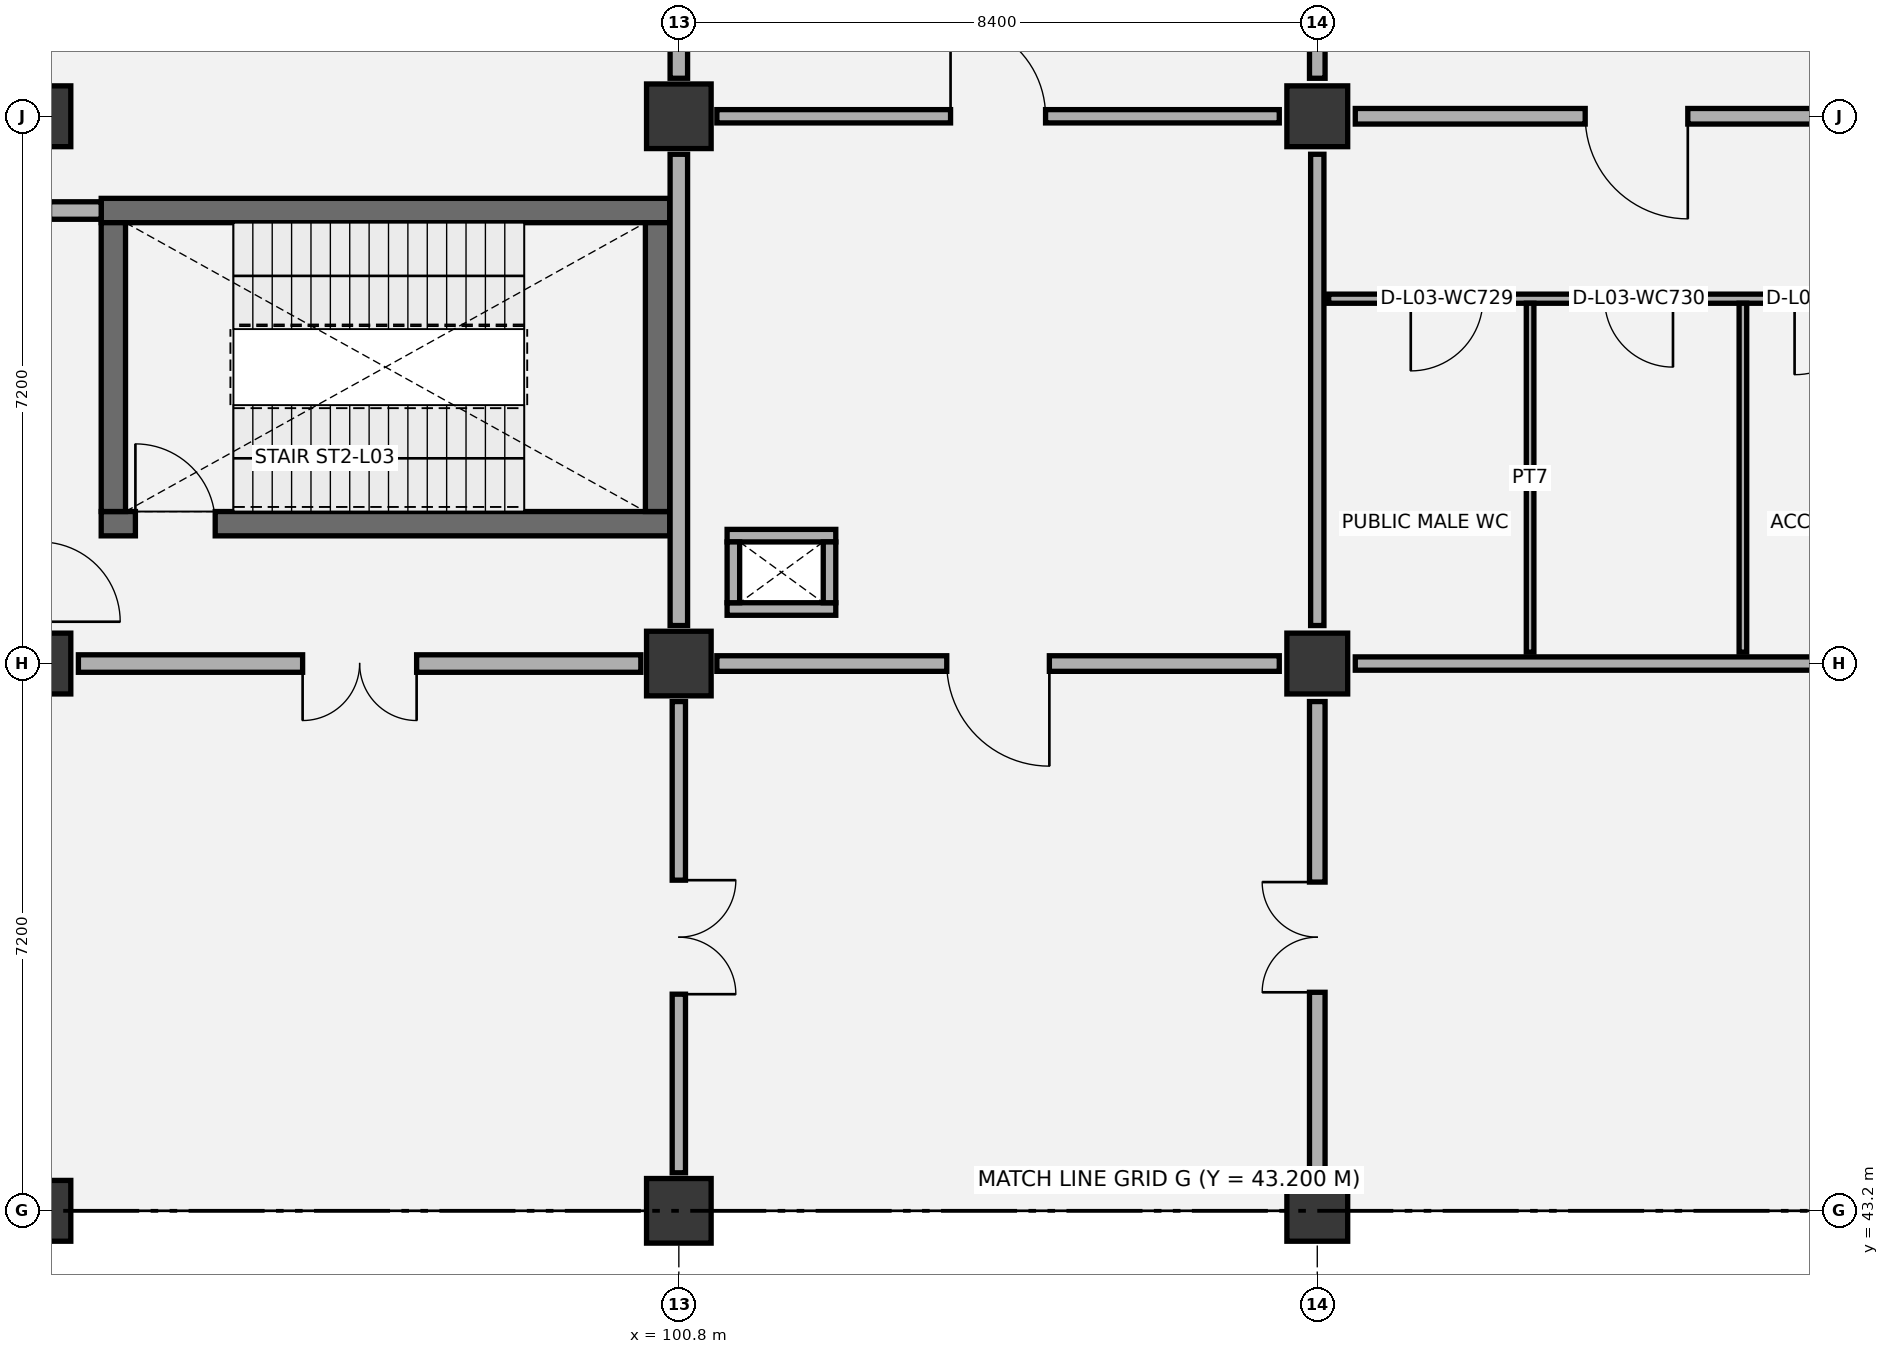
"""IFC4 building model, lengths in metres.
Left out: names, types, materials, properties, quantities, classifications, styles, units other than length and angle.
Written with IfcOpenShell. Run it as: python <this file> out.ifc"""

import sys

from ifc_helpers import new_model, si_unit, direction, frame, frame_2d, origin, origin_2d, place, context, subcontext, project, spatial, rectangle, extrude, element, fill, save


model = new_model("IFC4")
c1 = context("Model", 3, precision=1e-05, world=origin(), true_north=direction((0.0, 1.0)))
c2 = subcontext(c1, "Body", "Model", "MODEL_VIEW")
j1 = project(units=[si_unit("LENGTHUNIT", "METRE"), si_unit("PLANEANGLEUNIT", "RADIAN")], contexts=[c1])
p1 = place(None, origin())
s1 = spatial("IfcSite", under=j1, at=p1, CompositionType="ELEMENT")
p2 = place(p1, origin())
s2 = spatial("IfcBuilding", under=s1, at=p2, CompositionType="ELEMENT")
p3 = place(p2, frame((0.0, 0.0, 16.8)))
s3 = spatial("IfcBuildingStorey", under=s2, at=p3, CompositionType="ELEMENT", Elevation=16.8)
for number, where, z_axis, x_axis in (
    (1, (92.4, 43.2, 0.0), (0.0, 0.0, 1.0), (1.0, 0.0, 0.0)),
    (2, (92.4, 50.4, 0.0), (0.0, 0.0, 1.0), (1.0, 0.0, 0.0)),
    (3, (92.4, 57.6, 0.0), (0.0, 0.0, 1.0), (1.0, 0.0, 0.0)),
):
    element("IfcColumn", number, at=place(p3, frame(where, z_axis=z_axis, x_axis=x_axis)), inside=s3, PredefinedType="COLUMN", context=c2, shape_type="SweptSolid", body=[
        extrude(rectangle(XDim=0.8, YDim=0.8, at=origin_2d()), origin(), (0.0, 0.0, 1.0), 5.4),
    ])
for number, where, z_axis, x_axis in (
    (4, (100.8, 43.2, 0.0), (0.0, 0.0, 1.0), (1.0, 0.0, 0.0)),
    (5, (100.8, 50.4, 0.0), (0.0, 0.0, 1.0), (1.0, 0.0, 0.0)),
    (6, (100.8, 57.6, 0.0), (0.0, 0.0, 1.0), (1.0, 0.0, 0.0)),
):
    element("IfcColumn", number, at=place(p3, frame(where, z_axis=z_axis, x_axis=x_axis)), inside=s3, PredefinedType="COLUMN", context=c2, shape_type="SweptSolid", body=[
        extrude(rectangle(XDim=0.85, YDim=0.85, at=origin_2d()), origin(), (0.0, 0.0, 1.0), 5.4),
    ])
for number, where, z_axis, x_axis in (
    (7, (109.2, 43.2, 0.0), (0.0, 0.0, 1.0), (1.0, 0.0, 0.0)),
    (8, (109.2, 50.4, 0.0), (0.0, 0.0, 1.0), (1.0, 0.0, 0.0)),
    (9, (109.2, 57.6, 0.0), (0.0, 0.0, 1.0), (1.0, 0.0, 0.0)),
):
    element("IfcColumn", number, at=place(p3, frame(where, z_axis=z_axis, x_axis=x_axis)), inside=s3, PredefinedType="COLUMN", context=c2, shape_type="SweptSolid", body=[
        extrude(rectangle(XDim=0.8, YDim=0.8, at=origin_2d()), origin(), (0.0, 0.0, 1.0), 5.4),
    ])
p4 = place(p3, frame((93.2, 52.24, 0.0), z_axis=(0.0, 0.0, 1.0), x_axis=(1.0, 0.0, 0.0)))
e10 = element("IfcWall", 10, at=p4, inside=s3, PredefinedType="SHEAR", context=c2, shape_type="SweptSolid", body=[
    extrude(rectangle(XDim=7.48, YDim=0.32, at=frame_2d((3.74, 0.0))), origin(), (0.0, 0.0, 1.0), 4.95),
])
p5 = place(p4, frame((0.45, 0.0, 0.0)))
e11 = element("IfcOpeningElement", 11, at=p5, cuts=e10, PredefinedType="OPENING", context=c2, shape_type="SweptSolid", body=[
    extrude(rectangle(XDim=1.05, YDim=2.15, at=frame_2d((0.525, 1.075))), frame((0.0, 0.17, 0.0), z_axis=(0.0, -1.0, 0.0), x_axis=(1.0, 0.0, 0.0)), (0.0, 0.0, 1.0), 0.34),
])
p6 = place(p3, frame((93.2, 56.36, 0.0), z_axis=(0.0, 0.0, 1.0), x_axis=(1.0, 0.0, 0.0)))
e12 = element("IfcWall", 12, at=p6, inside=s3, PredefinedType="SHEAR", context=c2, shape_type="SweptSolid", body=[
    extrude(rectangle(XDim=7.48, YDim=0.32, at=frame_2d((3.74, 0.0))), origin(), (0.0, 0.0, 1.0), 4.95),
])
for number, where, z_axis, x_axis in (
    (13, (93.36, 52.4, 0.0), (0.0, 0.0, 1.0), (0.0, 1.0, 0.0)),
    (14, (100.52, 52.4, 0.0), (0.0, 0.0, 1.0), (0.0, 1.0, 0.0)),
):
    element("IfcWall", number, at=place(p3, frame(where, z_axis=z_axis, x_axis=x_axis)), inside=s3, PredefinedType="SHEAR", context=c2, shape_type="SweptSolid", body=[
        extrude(rectangle(XDim=3.8, YDim=0.32, at=frame_2d((1.9, 0.0))), origin(), (0.0, 0.0, 1.0), 4.95),
    ])
for number, where, z_axis, x_axis in (
    (15, (101.435, 51.117, 0.0), (0.0, 0.0, 1.0), (1.0, 0.0, 0.0)),
    (16, (101.435, 52.083, 0.0), (0.0, 0.0, 1.0), (1.0, 0.0, 0.0)),
):
    element("IfcWall", number, at=place(p3, frame(where, z_axis=z_axis, x_axis=x_axis)), inside=s3, PredefinedType="PARTITIONING", context=c2, shape_type="SweptSolid", body=[
        extrude(rectangle(XDim=1.43, YDim=0.165, at=frame_2d((0.715, 0.0))), origin(), (0.0, 0.0, 1.0), 4.825),
    ])
for number, where, z_axis, x_axis in (
    (17, (101.518, 51.2, 0.0), (0.0, 0.0, 1.0), (0.0, 1.0, 0.0)),
    (18, (102.782, 51.2, 0.0), (0.0, 0.0, 1.0), (0.0, 1.0, 0.0)),
):
    element("IfcWall", number, at=place(p3, frame(where, z_axis=z_axis, x_axis=x_axis)), inside=s3, PredefinedType="PARTITIONING", context=c2, shape_type="SweptSolid", body=[
        extrude(rectangle(XDim=0.8, YDim=0.165, at=frame_2d((0.4, 0.0))), origin(), (0.0, 0.0, 1.0), 4.825),
    ])
p7 = place(p3, frame((109.35, 55.2, 0.0), z_axis=(0.0, 0.0, 1.0), x_axis=(1.0, 0.0, 0.0)))
e19 = element("IfcWall", 19, at=p7, inside=s3, PredefinedType="PARTITIONING", context=c2, shape_type="SweptSolid", body=[
    extrude(rectangle(XDim=8.1, YDim=0.12, at=frame_2d((4.05, 0.0))), origin(), (0.0, 0.0, 1.0), 4.95),
])
p8 = place(p7, frame((1.08, 0.0, 0.0)))
e20 = element("IfcOpeningElement", 20, at=p8, cuts=e19, PredefinedType="OPENING", context=c2, shape_type="SweptSolid", body=[
    extrude(rectangle(XDim=0.95, YDim=2.1, at=frame_2d((0.475, 1.05))), frame((0.0, 0.07, 0.0), z_axis=(0.0, -1.0, 0.0), x_axis=(1.0, 0.0, 0.0)), (0.0, 0.0, 1.0), 0.14),
])
p9 = place(p7, frame((3.63, 0.0, 0.0)))
e21 = element("IfcOpeningElement", 21, at=p9, cuts=e19, PredefinedType="OPENING", context=c2, shape_type="SweptSolid", body=[
    extrude(rectangle(XDim=0.9, YDim=2.1, at=frame_2d((0.45, 1.05))), frame((0.0, 0.07, 0.0), z_axis=(0.0, -1.0, 0.0), x_axis=(1.0, 0.0, 0.0)), (0.0, 0.0, 1.0), 0.14),
])
p10 = place(p7, frame((6.13, 0.0, 0.0)))
e22 = element("IfcOpeningElement", 22, at=p10, cuts=e19, PredefinedType="OPENING", context=c2, shape_type="SweptSolid", body=[
    extrude(rectangle(XDim=1.0, YDim=2.1, at=frame_2d((0.5, 1.05))), frame((0.0, 0.07, 0.0), z_axis=(0.0, -1.0, 0.0), x_axis=(1.0, 0.0, 0.0)), (0.0, 0.0, 1.0), 0.14),
])
for number, where, z_axis, x_axis in (
    (23, (112.0, 50.55, 0.0), (0.0, 0.0, 1.0), (0.0, 1.0, 0.0)),
    (24, (114.8, 50.55, 0.0), (0.0, 0.0, 1.0), (0.0, 1.0, 0.0)),
):
    element("IfcWall", number, at=place(p3, frame(where, z_axis=z_axis, x_axis=x_axis)), inside=s3, PredefinedType="PARTITIONING", context=c2, shape_type="SweptSolid", body=[
        extrude(rectangle(XDim=4.59, YDim=0.1, at=frame_2d((2.295, 0.0))), origin(), (0.0, 0.0, 1.0), 4.95),
    ])
p11 = place(p3, frame((100.8, 43.7, 0.0), z_axis=(0.0, 0.0, 1.0), x_axis=(0.0, 1.0, 0.0)))
e25 = element("IfcWall", 25, at=p11, inside=s3, PredefinedType="PARTITIONING", context=c2, shape_type="SweptSolid", body=[
    extrude(rectangle(XDim=6.2, YDim=0.175, at=frame_2d((3.1, 0.0))), origin(), (0.0, 0.0, 1.0), 4.245),
])
p12 = place(p11, frame((2.35, 0.0, 0.0)))
e26 = element("IfcOpeningElement", 26, at=p12, cuts=e25, PredefinedType="OPENING", context=c2, shape_type="SweptSolid", body=[
    extrude(rectangle(XDim=1.5, YDim=2.2, at=frame_2d((0.75, 1.1))), frame((0.0, 0.097, 0.0), z_axis=(0.0, -1.0, 0.0), x_axis=(1.0, 0.0, 0.0)), (0.0, 0.0, 1.0), 0.195),
])
p13 = place(p3, frame((92.9, 50.4, 0.0), z_axis=(0.0, 0.0, 1.0), x_axis=(1.0, 0.0, 0.0)))
e27 = element("IfcWall", 27, at=p13, inside=s3, PredefinedType="PARTITIONING", context=c2, shape_type="SweptSolid", body=[
    extrude(rectangle(XDim=7.4, YDim=0.23, at=frame_2d((3.7, 0.0))), origin(), (0.0, 0.0, 1.0), 4.195),
])
p14 = place(p13, frame((2.95, 0.0, 0.0)))
e28 = element("IfcOpeningElement", 28, at=p14, cuts=e27, PredefinedType="OPENING", context=c2, shape_type="SweptSolid", body=[
    extrude(rectangle(XDim=1.5, YDim=2.15, at=frame_2d((0.75, 1.075))), frame((0.0, 0.125, 0.0), z_axis=(0.0, -1.0, 0.0), x_axis=(1.0, 0.0, 0.0)), (0.0, 0.0, 1.0), 0.25),
])
p15 = place(p3, frame((100.8, 50.9, 0.0), z_axis=(0.0, 0.0, 1.0), x_axis=(0.0, 1.0, 0.0)))
e29 = element("IfcWall", 29, at=p15, inside=s3, PredefinedType="PARTITIONING", context=c2, shape_type="SweptSolid", body=[
    extrude(rectangle(XDim=6.2, YDim=0.23, at=frame_2d((3.1, 0.0))), origin(), (0.0, 0.0, 1.0), 4.445),
])
p16 = place(p3, frame((92.52, 56.36, 0.0), z_axis=(0.0, 0.0, 1.0), x_axis=(1.0, 0.0, 0.0)))
e30 = element("IfcWall", 30, at=p16, inside=s3, PredefinedType="PARTITIONING", context=c2, shape_type="SweptSolid", body=[
    extrude(rectangle(XDim=0.68, YDim=0.23, at=frame_2d((0.34, 0.0))), origin(), (0.0, 0.0, 1.0), 4.95),
])
p17 = place(p3, frame((100.8, 58.1, 0.0), z_axis=(0.0, 0.0, 1.0), x_axis=(0.0, 1.0, 0.0)))
e31 = element("IfcWall", 31, at=p17, inside=s3, PredefinedType="PARTITIONING", context=c2, shape_type="SweptSolid", body=[
    extrude(rectangle(XDim=6.2, YDim=0.23, at=frame_2d((3.1, 0.0))), origin(), (0.0, 0.0, 1.0), 4.245),
])
p18 = place(p3, frame((109.2, 43.7, 0.0), z_axis=(0.0, 0.0, 1.0), x_axis=(0.0, 1.0, 0.0)))
e32 = element("IfcWall", 32, at=p18, inside=s3, PredefinedType="PARTITIONING", context=c2, shape_type="SweptSolid", body=[
    extrude(rectangle(XDim=6.2, YDim=0.205, at=frame_2d((3.1, 0.0))), origin(), (0.0, 0.0, 1.0), 4.445),
])
p19 = place(p18, frame((2.375, 0.0, 0.0)))
e33 = element("IfcOpeningElement", 33, at=p19, cuts=e32, PredefinedType="OPENING", context=c2, shape_type="SweptSolid", body=[
    extrude(rectangle(XDim=1.45, YDim=2.2, at=frame_2d((0.725, 1.1))), frame((0.0, 0.113, 0.0), z_axis=(0.0, -1.0, 0.0), x_axis=(1.0, 0.0, 0.0)), (0.0, 0.0, 1.0), 0.225),
])
p20 = place(p3, frame((101.3, 50.4, 0.0), z_axis=(0.0, 0.0, 1.0), x_axis=(1.0, 0.0, 0.0)))
e34 = element("IfcWall", 34, at=p20, inside=s3, PredefinedType="PARTITIONING", context=c2, shape_type="SweptSolid", body=[
    extrude(rectangle(XDim=7.4, YDim=0.205, at=frame_2d((3.7, 0.0))), origin(), (0.0, 0.0, 1.0), 4.195),
])
p21 = place(p20, frame((3.025, 0.0, 0.0)))
e35 = element("IfcOpeningElement", 35, at=p21, cuts=e34, PredefinedType="OPENING", context=c2, shape_type="SweptSolid", body=[
    extrude(rectangle(XDim=1.35, YDim=2.15, at=frame_2d((0.675, 1.075))), frame((0.0, 0.113, 0.0), z_axis=(0.0, -1.0, 0.0), x_axis=(1.0, 0.0, 0.0)), (0.0, 0.0, 1.0), 0.225),
])
p22 = place(p3, frame((109.2, 50.9, 0.0), z_axis=(0.0, 0.0, 1.0), x_axis=(0.0, 1.0, 0.0)))
e36 = element("IfcWall", 36, at=p22, inside=s3, PredefinedType="PARTITIONING", context=c2, shape_type="SweptSolid", body=[
    extrude(rectangle(XDim=6.2, YDim=0.175, at=frame_2d((3.1, 0.0))), origin(), (0.0, 0.0, 1.0), 4.245),
])
p23 = place(p3, frame((101.3, 57.6, 0.0), z_axis=(0.0, 0.0, 1.0), x_axis=(1.0, 0.0, 0.0)))
e37 = element("IfcWall", 37, at=p23, inside=s3, PredefinedType="PARTITIONING", context=c2, shape_type="SweptSolid", body=[
    extrude(rectangle(XDim=7.4, YDim=0.175, at=frame_2d((3.7, 0.0))), origin(), (0.0, 0.0, 1.0), 4.195),
])
p24 = place(p23, frame((3.075, 0.0, 0.0)))
e38 = element("IfcOpeningElement", 38, at=p24, cuts=e37, PredefinedType="OPENING", context=c2, shape_type="SweptSolid", body=[
    extrude(rectangle(XDim=1.25, YDim=2.1, at=frame_2d((0.625, 1.05))), frame((0.0, 0.097, 0.0), z_axis=(0.0, -1.0, 0.0), x_axis=(1.0, 0.0, 0.0)), (0.0, 0.0, 1.0), 0.195),
])
p25 = place(p3, frame((109.2, 58.1, 0.0), z_axis=(0.0, 0.0, 1.0), x_axis=(0.0, 1.0, 0.0)))
e39 = element("IfcWall", 39, at=p25, inside=s3, PredefinedType="PARTITIONING", context=c2, shape_type="SweptSolid", body=[
    extrude(rectangle(XDim=6.2, YDim=0.205, at=frame_2d((3.1, 0.0))), origin(), (0.0, 0.0, 1.0), 4.545),
])
p26 = place(p25, frame((2.35, 0.0, 0.0)))
e40 = element("IfcOpeningElement", 40, at=p26, cuts=e39, PredefinedType="OPENING", context=c2, shape_type="SweptSolid", body=[
    extrude(rectangle(XDim=1.5, YDim=2.2, at=frame_2d((0.75, 1.1))), frame((0.0, 0.113, 0.0), z_axis=(0.0, -1.0, 0.0), x_axis=(1.0, 0.0, 0.0)), (0.0, 0.0, 1.0), 0.225),
])
p27 = place(p3, frame((109.7, 50.4, 0.0), z_axis=(0.0, 0.0, 1.0), x_axis=(1.0, 0.0, 0.0)))
e41 = element("IfcWall", 41, at=p27, inside=s3, PredefinedType="PARTITIONING", context=c2, shape_type="SweptSolid", body=[
    extrude(rectangle(XDim=7.4, YDim=0.175, at=frame_2d((3.7, 0.0))), origin(), (0.0, 0.0, 1.0), 4.195),
])
p28 = place(p3, frame((109.7, 57.6, 0.0), z_axis=(0.0, 0.0, 1.0), x_axis=(1.0, 0.0, 0.0)))
e42 = element("IfcWall", 42, at=p28, inside=s3, PredefinedType="PARTITIONING", context=c2, shape_type="SweptSolid", body=[
    extrude(rectangle(XDim=7.4, YDim=0.205, at=frame_2d((3.7, 0.0))), origin(), (0.0, 0.0, 1.0), 4.195),
])
p29 = place(p28, frame((3.025, 0.0, 0.0)))
e43 = element("IfcOpeningElement", 43, at=p29, cuts=e42, PredefinedType="OPENING", context=c2, shape_type="SweptSolid", body=[
    extrude(rectangle(XDim=1.35, YDim=2.15, at=frame_2d((0.675, 1.075))), frame((0.0, 0.113, 0.0), z_axis=(0.0, -1.0, 0.0), x_axis=(1.0, 0.0, 0.0)), (0.0, 0.0, 1.0), 0.225),
])
p30 = place(p5, origin())
e44 = element("IfcDoor", 44, at=p30, inside=s3, OperationType="SINGLE_SWING_LEFT", PredefinedType="DOOR", context=c2, shape_type="SweptSolid", body=[
    extrude(rectangle(XDim=1.05, YDim=2.15, at=frame_2d((0.525, 1.075))), frame((0.0, 0.025, 0.0), z_axis=(0.0, -1.0, 0.0), x_axis=(1.0, 0.0, 0.0)), (0.0, 0.0, 1.0), 0.05),
])
fill(e11, e44)
p31 = place(p8, frame((0.95, 0.0, 0.0), z_axis=(0.0, 0.0, 1.0), x_axis=(-1.0, 0.0, 0.0)))
e45 = element("IfcDoor", 45, at=p31, inside=s3, OperationType="SINGLE_SWING_RIGHT", PredefinedType="DOOR", context=c2, shape_type="SweptSolid", body=[
    extrude(rectangle(XDim=0.95, YDim=2.1, at=frame_2d((0.475, 1.05))), frame((0.0, 0.025, 0.0), z_axis=(0.0, -1.0, 0.0), x_axis=(1.0, 0.0, 0.0)), (0.0, 0.0, 1.0), 0.05),
])
fill(e20, e45)
p32 = place(p9, frame((0.9, 0.0, 0.0), z_axis=(0.0, 0.0, 1.0), x_axis=(-1.0, 0.0, 0.0)))
e46 = element("IfcDoor", 46, at=p32, inside=s3, OperationType="SINGLE_SWING_LEFT", PredefinedType="DOOR", context=c2, shape_type="SweptSolid", body=[
    extrude(rectangle(XDim=0.9, YDim=2.1, at=frame_2d((0.45, 1.05))), frame((0.0, 0.025, 0.0), z_axis=(0.0, -1.0, 0.0), x_axis=(1.0, 0.0, 0.0)), (0.0, 0.0, 1.0), 0.05),
])
fill(e21, e46)
p33 = place(p10, frame((1.0, 0.0, 0.0), z_axis=(0.0, 0.0, 1.0), x_axis=(-1.0, 0.0, 0.0)))
e47 = element("IfcDoor", 47, at=p33, inside=s3, OperationType="SINGLE_SWING_RIGHT", PredefinedType="DOOR", context=c2, shape_type="SweptSolid", body=[
    extrude(rectangle(XDim=1.0, YDim=2.1, at=frame_2d((0.5, 1.05))), frame((0.0, 0.025, 0.0), z_axis=(0.0, -1.0, 0.0), x_axis=(1.0, 0.0, 0.0)), (0.0, 0.0, 1.0), 0.05),
])
fill(e22, e47)
p34 = place(p12, frame((1.5, 0.0, 0.0), z_axis=(0.0, 0.0, 1.0), x_axis=(-1.0, 0.0, 0.0)))
e48 = element("IfcDoor", 48, at=p34, inside=s3, OperationType="DOUBLE_DOOR_SINGLE_SWING", PredefinedType="DOOR", context=c2, shape_type="SweptSolid", body=[
    extrude(rectangle(XDim=1.5, YDim=2.2, at=frame_2d((0.75, 1.1))), frame((0.0, 0.025, 0.0), z_axis=(0.0, -1.0, 0.0), x_axis=(1.0, 0.0, 0.0)), (0.0, 0.0, 1.0), 0.05),
])
fill(e26, e48)
p35 = place(p14, frame((1.5, 0.0, 0.0), z_axis=(0.0, 0.0, 1.0), x_axis=(-1.0, 0.0, 0.0)))
e49 = element("IfcDoor", 49, at=p35, inside=s3, OperationType="DOUBLE_DOOR_SINGLE_SWING", PredefinedType="DOOR", context=c2, shape_type="SweptSolid", body=[
    extrude(rectangle(XDim=1.5, YDim=2.15, at=frame_2d((0.75, 1.075))), frame((0.0, 0.025, 0.0), z_axis=(0.0, -1.0, 0.0), x_axis=(1.0, 0.0, 0.0)), (0.0, 0.0, 1.0), 0.05),
])
fill(e28, e49)
p36 = place(p19, origin())
e50 = element("IfcDoor", 50, at=p36, inside=s3, OperationType="DOUBLE_DOOR_SINGLE_SWING", PredefinedType="DOOR", context=c2, shape_type="SweptSolid", body=[
    extrude(rectangle(XDim=1.45, YDim=2.2, at=frame_2d((0.725, 1.1))), frame((0.0, 0.025, 0.0), z_axis=(0.0, -1.0, 0.0), x_axis=(1.0, 0.0, 0.0)), (0.0, 0.0, 1.0), 0.05),
])
fill(e33, e50)
p37 = place(p21, frame((1.35, 0.0, 0.0), z_axis=(0.0, 0.0, 1.0), x_axis=(-1.0, 0.0, 0.0)))
e51 = element("IfcDoor", 51, at=p37, inside=s3, OperationType="SINGLE_SWING_LEFT", PredefinedType="DOOR", context=c2, shape_type="SweptSolid", body=[
    extrude(rectangle(XDim=1.35, YDim=2.15, at=frame_2d((0.675, 1.075))), frame((0.0, 0.025, 0.0), z_axis=(0.0, -1.0, 0.0), x_axis=(1.0, 0.0, 0.0)), (0.0, 0.0, 1.0), 0.05),
])
fill(e35, e51)
p38 = place(p24, origin())
e52 = element("IfcDoor", 52, at=p38, inside=s3, OperationType="SINGLE_SWING_LEFT", PredefinedType="DOOR", context=c2, shape_type="SweptSolid", body=[
    extrude(rectangle(XDim=1.25, YDim=2.1, at=frame_2d((0.625, 1.05))), frame((0.0, 0.025, 0.0), z_axis=(0.0, -1.0, 0.0), x_axis=(1.0, 0.0, 0.0)), (0.0, 0.0, 1.0), 0.05),
])
fill(e38, e52)
p39 = place(p29, frame((1.35, 0.0, 0.0), z_axis=(0.0, 0.0, 1.0), x_axis=(-1.0, 0.0, 0.0)))
e53 = element("IfcDoor", 53, at=p39, inside=s3, OperationType="SINGLE_SWING_LEFT", PredefinedType="DOOR", context=c2, shape_type="SweptSolid", body=[
    extrude(rectangle(XDim=1.35, YDim=2.15, at=frame_2d((0.675, 1.075))), frame((0.0, 0.025, 0.0), z_axis=(0.0, -1.0, 0.0), x_axis=(1.0, 0.0, 0.0)), (0.0, 0.0, 1.0), 0.05),
])
fill(e43, e53)
save(model, sys.argv[1])
